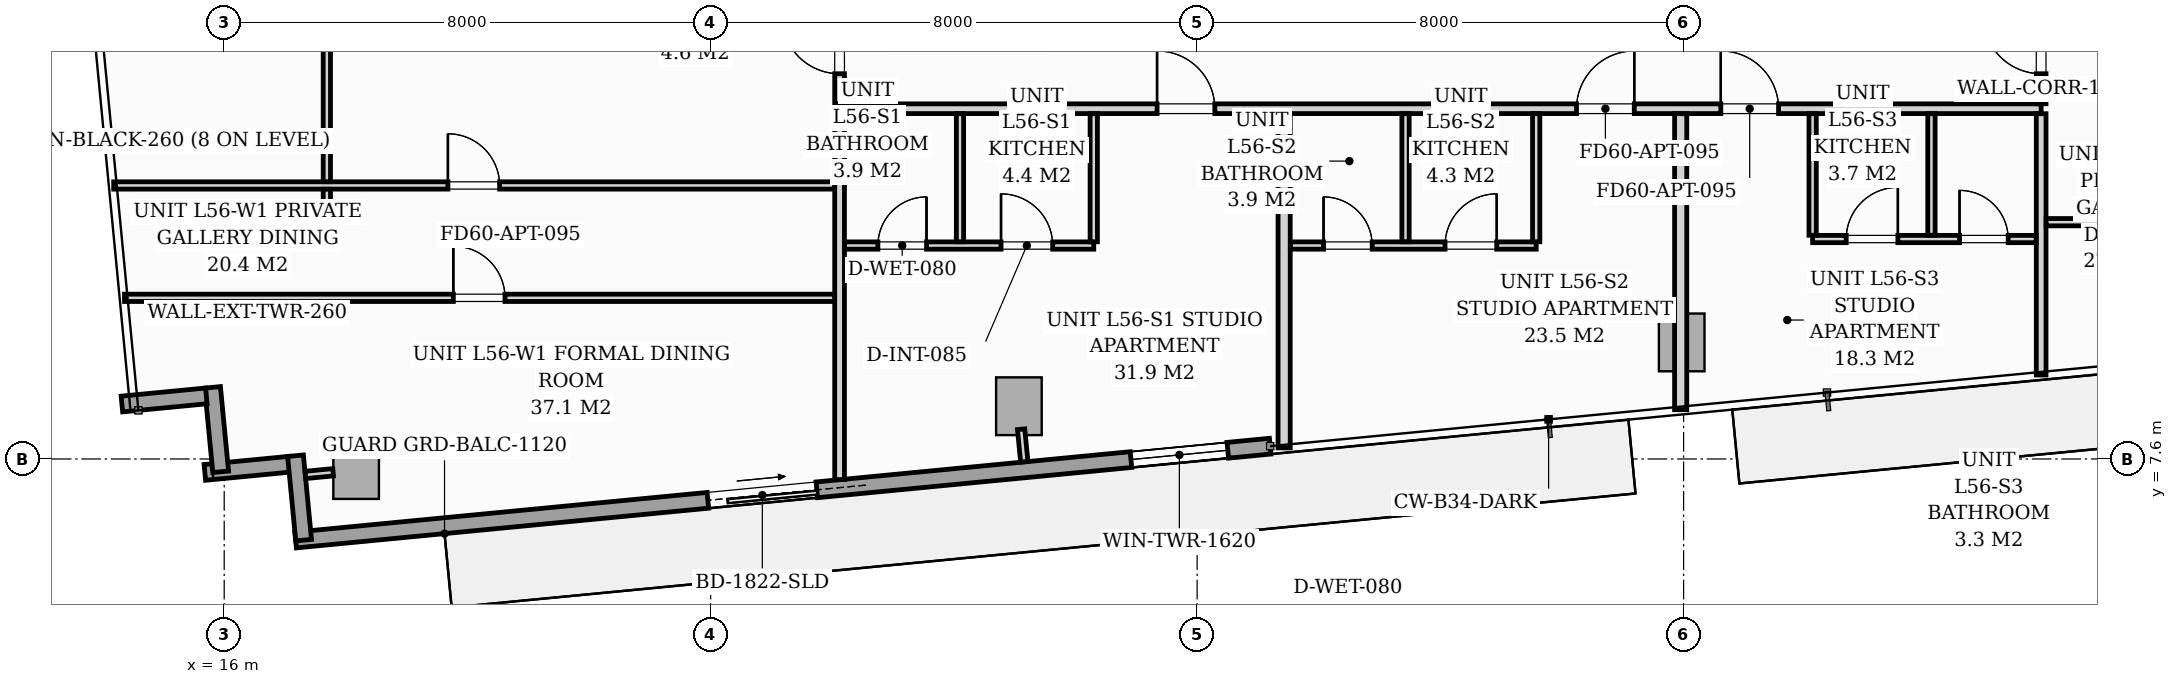
"""IFC4 building model, lengths in metres.
Left out: names, types, materials, properties, quantities, classifications, styles, units other than length and angle.
Written with IfcOpenShell. Run it as: python <this file> out.ifc"""

import sys

from ifc_helpers import new_model, si_unit, direction, frame, frame_2d, origin, origin_2d, place, context, subcontext, project, spatial, rectangle, extrude, source, transform, mapped, element, fill, save


model = new_model("IFC4")
c1 = context("Model", 3, precision=1e-05, world=origin(), true_north=direction((0.0, 1.0)))
c2 = subcontext(c1, "Body", "Model", "MODEL_VIEW")
j1 = project(units=[si_unit("LENGTHUNIT", "METRE"), si_unit("PLANEANGLEUNIT", "RADIAN")], contexts=[c1])
p1 = place(None, origin())
s1 = spatial("IfcSite", under=j1, at=p1, CompositionType="ELEMENT")
p2 = place(p1, origin())
s2 = spatial("IfcBuilding", under=s1, at=p2, CompositionType="ELEMENT")
p3 = place(p2, frame((0.0, 0.0, 195.4)))
s3 = spatial("IfcBuildingStorey", under=s2, at=p3, CompositionType="ELEMENT", Elevation=195.4)
m1 = source(origin(), c2, "Body", "SweptSolid", [
    extrude(rectangle(XDim=0.75, YDim=0.95, at=origin_2d()), origin(), (0.0, 0.0, 1.0), 3.196),
])
for number, where, z_axis, x_axis in (
    (1, (18.169, 7.418, 0.002), (0.0, 0.0, 1.0), (0.995, 0.096, 0.0)),
    (2, (29.069, 8.467, 0.002), (0.0, 0.0, 1.0), (0.995, 0.096, 0.0)),
    (3, (39.969, 9.517, 0.002), (0.0, 0.0, 1.0), (0.995, 0.096, 0.0)),
):
    element("IfcColumn", number, at=place(p3, frame(where, z_axis=z_axis, x_axis=x_axis)), inside=s3, PredefinedType="COLUMN", context=c2, shape_type="MappedRepresentation", body=[
        mapped(m1, transform((0.0, 0.0, 0.0), scale=1.0)),
    ])
p4 = place(p3, frame((17.07, 7.513, 0.0), z_axis=(0.0, 0.0, 1.0), x_axis=(-0.995391056452, -0.09589913835, 0.0)))
e4 = element("IfcWall", 4, at=p4, inside=s3, PredefinedType="STANDARD", context=c2, shape_type="SweptSolid", body=[
    extrude(rectangle(XDim=1.395, YDim=0.26, at=frame_2d((0.698, 0.0))), origin(), (0.0, 0.0, 1.0), 2.94),
])
p5 = place(p3, frame((15.942, 7.389, 0.0), z_axis=(0.0, 0.0, 1.0), x_axis=(-0.095742423056, 0.99540614245, 0.0)))
e5 = element("IfcWall", 5, at=p5, inside=s3, PredefinedType="STANDARD", context=c2, shape_type="SweptSolid", body=[
    extrude(rectangle(XDim=1.395, YDim=0.26, at=frame_2d((0.697, 0.0))), origin(), (0.0, 0.0, 1.0), 2.94),
])
p6 = place(p3, frame((15.706, 8.637, 0.0), z_axis=(0.0, 0.0, 1.0), x_axis=(-0.995391056452, -0.09589913835, 0.0)))
e6 = element("IfcWall", 6, at=p6, inside=s3, PredefinedType="STANDARD", context=c2, shape_type="SweptSolid", body=[
    extrude(rectangle(XDim=1.395, YDim=0.26, at=frame_2d((0.698, 0.0))), origin(), (0.0, 0.0, 1.0), 2.94),
])
p7 = place(p3, frame((33.201, 7.81, 0.0), z_axis=(0.0, 0.0, 1.0), x_axis=(-0.995397074604, -0.095836652014, 0.0)))
e7 = element("IfcWall", 7, at=p7, inside=s3, PredefinedType="STANDARD", context=c2, shape_type="SweptSolid", body=[
    extrude(rectangle(XDim=16.1, YDim=0.26, at=frame_2d((8.05, 0.0))), origin(), (0.0, 0.0, 1.0), 2.94),
])
p8 = place(p7, frame((7.49, 0.0, 0.0)))
e8 = element("IfcOpeningElement", 8, at=p8, cuts=e7, PredefinedType="OPENING", context=c2, shape_type="SweptSolid", body=[
    extrude(rectangle(XDim=1.8, YDim=2.06, at=frame_2d((0.9, 1.03))), frame((0.0, 0.14, 0.0), z_axis=(0.0, -1.0, 0.0), x_axis=(1.0, 0.0, 0.0)), (0.0, 0.0, 1.0), 0.28),
])
p9 = place(p7, frame((0.7, 0.0, 0.65)))
e9 = element("IfcOpeningElement", 9, at=p9, cuts=e7, PredefinedType="OPENING", context=c2, shape_type="SweptSolid", body=[
    extrude(rectangle(XDim=1.6, YDim=1.5, at=frame_2d((0.8, 0.75))), frame((0.0, 0.14, 0.0), z_axis=(0.0, -1.0, 0.0), x_axis=(1.0, 0.0, 0.0)), (0.0, 0.0, 1.0), 0.28),
])
p10 = place(p3, frame((17.306, 6.265, 0.0), z_axis=(0.0, 0.0, 1.0), x_axis=(-0.095915846097, 0.995389446633, 0.0)))
e10 = element("IfcWall", 10, at=p10, inside=s3, PredefinedType="STANDARD", context=c2, shape_type="SweptSolid", body=[
    extrude(rectangle(XDim=1.395, YDim=0.26, at=frame_2d((0.697, 0.0))), origin(), (0.0, 0.0, 1.0), 2.94),
])
p11 = place(p3, frame((26.12, 13.36, 0.0), z_axis=(0.0, 0.0, 1.0), x_axis=(1.0, 0.0, 0.0)))
e11 = element("IfcWall", 11, at=p11, inside=s3, PredefinedType="PARTITIONING", context=c2, shape_type="SweptSolid", body=[
    extrude(rectangle(XDim=19.76, YDim=0.16, at=frame_2d((9.88, 0.0))), origin(), (0.0, 0.0, 1.0), 2.94),
])
p12 = place(p11, frame((5.221, 0.0, 0.0)))
e12 = element("IfcOpeningElement", 12, at=p12, cuts=e11, PredefinedType="OPENING", context=c2, shape_type="SweptSolid", body=[
    extrude(rectangle(XDim=0.95, YDim=2.06, at=frame_2d((0.475, 1.03))), frame((0.0, 0.09, 0.0), z_axis=(0.0, -1.0, 0.0), x_axis=(1.0, 0.0, 0.0)), (0.0, 0.0, 1.0), 0.18),
])
p13 = place(p11, frame((12.119, 0.0, 0.0)))
e13 = element("IfcOpeningElement", 13, at=p13, cuts=e11, PredefinedType="OPENING", context=c2, shape_type="SweptSolid", body=[
    extrude(rectangle(XDim=0.95, YDim=2.06, at=frame_2d((0.475, 1.03))), frame((0.0, 0.09, 0.0), z_axis=(0.0, -1.0, 0.0), x_axis=(1.0, 0.0, 0.0)), (0.0, 0.0, 1.0), 0.18),
])
p14 = place(p11, frame((14.492, 0.0, 0.0)))
e14 = element("IfcOpeningElement", 14, at=p14, cuts=e11, PredefinedType="OPENING", context=c2, shape_type="SweptSolid", body=[
    extrude(rectangle(XDim=0.95, YDim=2.06, at=frame_2d((0.475, 1.03))), frame((0.0, 0.09, 0.0), z_axis=(0.0, -1.0, 0.0), x_axis=(1.0, 0.0, 0.0)), (0.0, 0.0, 1.0), 0.18),
])
p15 = place(p3, frame((26.12, 7.261, 0.0), z_axis=(0.0, 0.0, 1.0), x_axis=(0.0, 1.0, 0.0)))
e15 = element("IfcWall", 15, at=p15, inside=s3, PredefinedType="PARTITIONING", context=c2, shape_type="SweptSolid", body=[
    extrude(rectangle(XDim=6.017, YDim=0.16, at=frame_2d((3.008, 0.0))), origin(), (0.0, 0.0, 1.0), 2.94),
])
p16 = place(p3, frame((26.12, 13.442, 0.0), z_axis=(0.0, 0.0, 1.0), x_axis=(0.0, 1.0, 0.0)))
e16 = element("IfcWall", 16, at=p16, inside=s3, PredefinedType="PARTITIONING", context=c2, shape_type="SweptSolid", body=[
    extrude(rectangle(XDim=4.36, YDim=0.16, at=frame_2d((2.18, 0.0))), origin(), (0.0, 0.0, 1.0), 2.94),
])
p17 = place(p16, frame((0.493, 0.0, 0.0)))
e17 = element("IfcOpeningElement", 17, at=p17, cuts=e16, PredefinedType="OPENING", context=c2, shape_type="SweptSolid", body=[
    extrude(rectangle(XDim=0.95, YDim=2.06, at=frame_2d((0.475, 1.03))), frame((0.0, 0.09, 0.0), z_axis=(0.0, -1.0, 0.0), x_axis=(1.0, 0.0, 0.0)), (0.0, 0.0, 1.0), 0.18),
])
p18 = place(p3, frame((45.88, 8.981, 0.0), z_axis=(0.0, 0.0, 1.0), x_axis=(0.0, 1.0, 0.0)))
e18 = element("IfcWall", 18, at=p18, inside=s3, PredefinedType="PARTITIONING", context=c2, shape_type="SweptSolid", body=[
    extrude(rectangle(XDim=4.297, YDim=0.16, at=frame_2d((2.148, 0.0))), origin(), (0.0, 0.0, 1.0), 2.94),
])
p19 = place(p3, frame((45.88, 13.442, 0.0), z_axis=(0.0, 0.0, 1.0), x_axis=(0.0, 1.0, 0.0)))
e19 = element("IfcWall", 19, at=p19, inside=s3, PredefinedType="PARTITIONING", context=c2, shape_type="SweptSolid", body=[
    extrude(rectangle(XDim=4.36, YDim=0.16, at=frame_2d((2.18, 0.0))), origin(), (0.0, 0.0, 1.0), 2.94),
])
p20 = place(p19, frame((0.493, 0.0, 0.0)))
e20 = element("IfcOpeningElement", 20, at=p20, cuts=e19, PredefinedType="OPENING", context=c2, shape_type="SweptSolid", body=[
    extrude(rectangle(XDim=0.95, YDim=2.06, at=frame_2d((0.475, 1.03))), frame((0.0, 0.09, 0.0), z_axis=(0.0, -1.0, 0.0), x_axis=(1.0, 0.0, 0.0)), (0.0, 0.0, 1.0), 0.18),
])
p21 = place(p3, frame((26.202, 11.11, 0.0), z_axis=(0.0, 0.0, 1.0), x_axis=(1.0, 0.0, 0.0)))
e21 = element("IfcWall", 21, at=p21, inside=s3, PredefinedType="PARTITIONING", context=c2, shape_type="SweptSolid", body=[
    extrude(rectangle(XDim=4.098, YDim=0.12, at=frame_2d((2.049, 0.0))), origin(), (0.0, 0.0, 1.0), 2.94),
])
p22 = place(p21, frame((0.548, 0.0, 0.0)))
e22 = element("IfcOpeningElement", 22, at=p22, cuts=e21, PredefinedType="OPENING", context=c2, shape_type="SweptSolid", body=[
    extrude(rectangle(XDim=0.8, YDim=2.02, at=frame_2d((0.4, 1.01))), frame((0.0, 0.07, 0.0), z_axis=(0.0, -1.0, 0.0), x_axis=(1.0, 0.0, 0.0)), (0.0, 0.0, 1.0), 0.14),
])
p23 = place(p21, frame((2.573, 0.0, 0.0)))
e23 = element("IfcOpeningElement", 23, at=p23, cuts=e21, PredefinedType="OPENING", context=c2, shape_type="SweptSolid", body=[
    extrude(rectangle(XDim=0.85, YDim=2.05, at=frame_2d((0.425, 1.025))), frame((0.0, 0.07, 0.0), z_axis=(0.0, -1.0, 0.0), x_axis=(1.0, 0.0, 0.0)), (0.0, 0.0, 1.0), 0.14),
])
for number, where, z_axis, x_axis in (
    (24, (30.3, 11.172, 0.0), (0.0, 0.0, 1.0), (0.0, 1.0, 0.0)),
    (25, (28.1, 11.172, 0.0), (0.0, 0.0, 1.0), (0.0, 1.0, 0.0)),
):
    element("IfcWall", number, at=place(p3, frame(where, z_axis=z_axis, x_axis=x_axis)), inside=s3, PredefinedType="PARTITIONING", context=c2, shape_type="SweptSolid", body=[
        extrude(rectangle(XDim=2.106, YDim=0.12, at=frame_2d((1.053, 0.0))), origin(), (0.0, 0.0, 1.0), 2.94),
    ])
p24 = place(p3, frame((33.431, 7.782, 0.0), z_axis=(0.0, 0.0, 1.0), x_axis=(0.0, 1.0, 0.0)))
e26 = element("IfcWall", 26, at=p24, inside=s3, PredefinedType="PARTITIONING", context=c2, shape_type="SweptSolid", body=[
    extrude(rectangle(XDim=5.496, YDim=0.2, at=frame_2d((2.748, 0.0))), origin(), (0.0, 0.0, 1.0), 2.94),
])
p25 = place(p3, frame((33.533, 11.11, 0.0), z_axis=(0.0, 0.0, 1.0), x_axis=(1.0, 0.0, 0.0)))
e27 = element("IfcWall", 27, at=p25, inside=s3, PredefinedType="PARTITIONING", context=c2, shape_type="SweptSolid", body=[
    extrude(rectangle(XDim=4.043, YDim=0.12, at=frame_2d((2.021, 0.0))), origin(), (0.0, 0.0, 1.0), 2.94),
])
p26 = place(p25, frame((0.546, 0.0, 0.0)))
e28 = element("IfcOpeningElement", 28, at=p26, cuts=e27, PredefinedType="OPENING", context=c2, shape_type="SweptSolid", body=[
    extrude(rectangle(XDim=0.8, YDim=2.02, at=frame_2d((0.4, 1.01))), frame((0.0, 0.07, 0.0), z_axis=(0.0, -1.0, 0.0), x_axis=(1.0, 0.0, 0.0)), (0.0, 0.0, 1.0), 0.14),
])
p27 = place(p25, frame((2.544, 0.0, 0.0)))
e29 = element("IfcOpeningElement", 29, at=p27, cuts=e27, PredefinedType="OPENING", context=c2, shape_type="SweptSolid", body=[
    extrude(rectangle(XDim=0.85, YDim=2.05, at=frame_2d((0.425, 1.025))), frame((0.0, 0.07, 0.0), z_axis=(0.0, -1.0, 0.0), x_axis=(1.0, 0.0, 0.0)), (0.0, 0.0, 1.0), 0.14),
])
for number, where, z_axis, x_axis in (
    (30, (37.576, 11.172, 0.0), (0.0, 0.0, 1.0), (0.0, 1.0, 0.0)),
    (31, (35.427, 11.172, 0.0), (0.0, 0.0, 1.0), (0.0, 1.0, 0.0)),
):
    element("IfcWall", number, at=place(p3, frame(where, z_axis=z_axis, x_axis=x_axis)), inside=s3, PredefinedType="PARTITIONING", context=c2, shape_type="SweptSolid", body=[
        extrude(rectangle(XDim=2.106, YDim=0.12, at=frame_2d((1.053, 0.0))), origin(), (0.0, 0.0, 1.0), 2.94),
    ])
p28 = place(p3, frame((39.952, 8.41, 0.0), z_axis=(0.0, 0.0, 1.0), x_axis=(0.0, 1.0, 0.0)))
e32 = element("IfcWall", 32, at=p28, inside=s3, PredefinedType="PARTITIONING", context=c2, shape_type="SweptSolid", body=[
    extrude(rectangle(XDim=4.868, YDim=0.2, at=frame_2d((2.434, 0.0))), origin(), (0.0, 0.0, 1.0), 2.94),
])
p29 = place(p3, frame((42.122, 11.217, 0.0), z_axis=(0.0, 0.0, 1.0), x_axis=(1.0, 0.0, 0.0)))
e33 = element("IfcWall", 33, at=p29, inside=s3, PredefinedType="PARTITIONING", context=c2, shape_type="SweptSolid", body=[
    extrude(rectangle(XDim=3.676, YDim=0.12, at=frame_2d((1.838, 0.0))), origin(), (0.0, 0.0, 1.0), 2.94),
])
p30 = place(p29, frame((0.552, 0.0, 0.0)))
e34 = element("IfcOpeningElement", 34, at=p30, cuts=e33, PredefinedType="OPENING", context=c2, shape_type="SweptSolid", body=[
    extrude(rectangle(XDim=0.85, YDim=2.05, at=frame_2d((0.425, 1.025))), frame((0.0, 0.07, 0.0), z_axis=(0.0, -1.0, 0.0), x_axis=(1.0, 0.0, 0.0)), (0.0, 0.0, 1.0), 0.14),
])
p31 = place(p29, frame((2.416, 0.0, 0.0)))
e35 = element("IfcOpeningElement", 35, at=p31, cuts=e33, PredefinedType="OPENING", context=c2, shape_type="SweptSolid", body=[
    extrude(rectangle(XDim=0.8, YDim=2.02, at=frame_2d((0.4, 1.01))), frame((0.0, 0.07, 0.0), z_axis=(0.0, -1.0, 0.0), x_axis=(1.0, 0.0, 0.0)), (0.0, 0.0, 1.0), 0.14),
])
for number, where, z_axis, x_axis in (
    (36, (42.122, 11.279, 0.0), (0.0, 0.0, 1.0), (0.0, 1.0, 0.0)),
    (37, (44.076, 11.279, 0.0), (0.0, 0.0, 1.0), (0.0, 1.0, 0.0)),
):
    element("IfcWall", number, at=place(p3, frame(where, z_axis=z_axis, x_axis=x_axis)), inside=s3, PredefinedType="PARTITIONING", context=c2, shape_type="SweptSolid", body=[
        extrude(rectangle(XDim=1.999, YDim=0.12, at=frame_2d((1.0, 0.0))), origin(), (0.0, 0.0, 1.0), 2.94),
    ])
p32 = place(p3, frame((14.361, 10.25, 0.0), z_axis=(0.0, 0.0, 1.0), x_axis=(1.0, 0.0, 0.0)))
e38 = element("IfcWall", 38, at=p32, inside=s3, PredefinedType="PARTITIONING", context=c2, shape_type="SweptSolid", body=[
    extrude(rectangle(XDim=11.677, YDim=0.12, at=frame_2d((5.839, 0.0))), origin(), (0.0, 0.0, 1.0), 2.94),
])
p33 = place(p32, frame((5.407, 0.0, 0.0)))
e39 = element("IfcOpeningElement", 39, at=p33, cuts=e38, PredefinedType="OPENING", context=c2, shape_type="SweptSolid", body=[
    extrude(rectangle(XDim=0.85, YDim=2.05, at=frame_2d((0.425, 1.025))), frame((0.0, 0.07, 0.0), z_axis=(0.0, -1.0, 0.0), x_axis=(1.0, 0.0, 0.0)), (0.0, 0.0, 1.0), 0.14),
])
p34 = place(p3, frame((14.183, 12.098, 0.0), z_axis=(0.0, 0.0, 1.0), x_axis=(1.0, 0.0, 0.0)))
e40 = element("IfcWall", 40, at=p34, inside=s3, PredefinedType="PARTITIONING", context=c2, shape_type="SweptSolid", body=[
    extrude(rectangle(XDim=11.855, YDim=0.12, at=frame_2d((5.928, 0.0))), origin(), (0.0, 0.0, 1.0), 2.94),
])
p35 = place(p34, frame((5.496, 0.0, 0.0)))
e41 = element("IfcOpeningElement", 41, at=p35, cuts=e40, PredefinedType="OPENING", context=c2, shape_type="SweptSolid", body=[
    extrude(rectangle(XDim=0.85, YDim=2.05, at=frame_2d((0.425, 1.025))), frame((0.0, 0.07, 0.0), z_axis=(0.0, -1.0, 0.0), x_axis=(1.0, 0.0, 0.0)), (0.0, 0.0, 1.0), 0.14),
])
p36 = place(p3, frame((17.688, 11.658, 0.0), z_axis=(0.0, 0.0, 1.0), x_axis=(0.0, 1.0, 0.0)))
e42 = element("IfcWall", 42, at=p36, inside=s3, PredefinedType="PARTITIONING", context=c2, shape_type="SweptSolid", body=[
    extrude(rectangle(XDim=0.378, YDim=0.12, at=frame_2d((0.189, 0.0))), origin(), (0.0, 0.0, 1.0), 2.94),
])
p37 = place(p3, frame((17.688, 12.16, 0.0), z_axis=(0.0, 0.0, 1.0), x_axis=(0.0, 1.0, 0.0)))
e43 = element("IfcWall", 43, at=p37, inside=s3, PredefinedType="PARTITIONING", context=c2, shape_type="SweptSolid", body=[
    extrude(rectangle(XDim=8.689, YDim=0.12, at=frame_2d((4.345, 0.0))), origin(), (0.0, 0.0, 1.0), 2.94),
])
p38 = place(p37, frame((3.92, 0.0, 0.0)))
e44 = element("IfcOpeningElement", 44, at=p38, cuts=e43, PredefinedType="OPENING", context=c2, shape_type="SweptSolid", body=[
    extrude(rectangle(XDim=0.85, YDim=2.05, at=frame_2d((0.425, 1.025))), frame((0.0, 0.07, 0.0), z_axis=(0.0, -1.0, 0.0), x_axis=(1.0, 0.0, 0.0)), (0.0, 0.0, 1.0), 0.14),
])
p39 = place(p3, frame((45.962, 11.494, 0.0), z_axis=(0.0, 0.0, 1.0), x_axis=(1.0, 0.0, 0.0)))
e45 = element("IfcWall", 45, at=p39, inside=s3, PredefinedType="PARTITIONING", context=c2, shape_type="SweptSolid", body=[
    extrude(rectangle(XDim=16.66, YDim=0.12, at=frame_2d((8.33, 0.0))), origin(), (0.0, 0.0, 1.0), 2.383),
])
p40 = place(p39, frame((6.186, 0.0, 0.0)))
e46 = element("IfcOpeningElement", 46, at=p40, cuts=e45, PredefinedType="OPENING", context=c2, shape_type="SweptSolid", body=[
    extrude(rectangle(XDim=0.85, YDim=2.05, at=frame_2d((0.425, 1.025))), frame((0.0, 0.07, 0.0), z_axis=(0.0, -1.0, 0.0), x_axis=(1.0, 0.0, 0.0)), (0.0, 0.0, 1.0), 0.14),
])
p41 = place(p3, frame((17.791, 7.382, 0.0), z_axis=(0.0, 0.0, 1.0), x_axis=(-0.995384576284, -0.09596637586, 0.0)))
e47 = element("IfcWall", 47, at=p41, inside=s3, PredefinedType="PARTITIONING", context=c2, shape_type="SweptSolid", body=[
    extrude(rectangle(XDim=0.458, YDim=0.12, at=frame_2d((0.229, 0.0))), origin(), (0.0, 0.0, 1.0), 2.94),
])
p42 = place(p3, frame((29.105, 8.089, 0.0), z_axis=(0.0, 0.0, 1.0), x_axis=(0.095772948675, -0.995403205893, 0.0)))
e48 = element("IfcWall", 48, at=p42, inside=s3, PredefinedType="PARTITIONING", context=c2, shape_type="SweptSolid", body=[
    extrude(rectangle(XDim=0.538, YDim=0.12, at=frame_2d((0.269, 0.0))), origin(), (0.0, 0.0, 1.0), 2.94),
])
m2 = source(origin(), c2, "Body", "SweptSolid", [
    extrude(rectangle(XDim=1.8, YDim=2.06, at=frame_2d((0.9, 1.03))), frame((0.0, 0.025, 0.0), z_axis=(0.0, -1.0, 0.0), x_axis=(1.0, 0.0, 0.0)), (0.0, 0.0, 1.0), 0.05),
])
p43 = place(p8, origin())
e49 = element("IfcDoor", 49, at=p43, inside=s3, OperationType="SLIDING_TO_LEFT", PredefinedType="DOOR", context=c2, shape_type="MappedRepresentation", body=[
    mapped(m2, transform((0.0, 0.0, 0.0), scale=1.0)),
])
fill(e8, e49)
m3 = source(origin(), c2, "Body", "SweptSolid", [
    extrude(rectangle(XDim=1.6, YDim=1.5, at=frame_2d((0.8, 0.75))), frame((0.0, 0.03, 0.0), z_axis=(0.0, -1.0, 0.0), x_axis=(1.0, 0.0, 0.0)), (0.0, 0.0, 1.0), 0.06),
])
p44 = place(p9, origin())
e50 = element("IfcWindow", 50, at=p44, inside=s3, PartitioningType="SINGLE_PANEL", PredefinedType="WINDOW", context=c2, shape_type="MappedRepresentation", body=[
    mapped(m3, transform((0.0, 0.0, 0.0), scale=1.0)),
])
fill(e9, e50)
m4 = source(origin(), c2, "Body", "SweptSolid", [
    extrude(rectangle(XDim=0.95, YDim=2.06, at=frame_2d((0.475, 1.03))), frame((0.0, 0.025, 0.0), z_axis=(0.0, -1.0, 0.0), x_axis=(1.0, 0.0, 0.0)), (0.0, 0.0, 1.0), 0.05),
])
p45 = place(p12, origin())
e51 = element("IfcDoor", 51, at=p45, inside=s3, OperationType="SINGLE_SWING_LEFT", PredefinedType="DOOR", context=c2, shape_type="MappedRepresentation", body=[
    mapped(m4, transform((0.0, 0.0, 0.0), scale=1.0)),
])
fill(e12, e51)
m5 = source(origin(), c2, "Body", "SweptSolid", [
    extrude(rectangle(XDim=0.8, YDim=2.02, at=frame_2d((0.4, 1.01))), frame((0.0, 0.025, 0.0), z_axis=(0.0, -1.0, 0.0), x_axis=(1.0, 0.0, 0.0)), (0.0, 0.0, 1.0), 0.05),
])
p46 = place(p22, origin())
e52 = element("IfcDoor", 52, at=p46, inside=s3, OperationType="SINGLE_SWING_RIGHT", PredefinedType="DOOR", context=c2, shape_type="MappedRepresentation", body=[
    mapped(m5, transform((0.0, 0.0, 0.0), scale=1.0)),
])
fill(e22, e52)
m6 = source(origin(), c2, "Body", "SweptSolid", [
    extrude(rectangle(XDim=0.85, YDim=2.05, at=frame_2d((0.425, 1.025))), frame((0.0, 0.025, 0.0), z_axis=(0.0, -1.0, 0.0), x_axis=(1.0, 0.0, 0.0)), (0.0, 0.0, 1.0), 0.05),
])
p47 = place(p23, origin())
e53 = element("IfcDoor", 53, at=p47, inside=s3, OperationType="SINGLE_SWING_LEFT", PredefinedType="DOOR", context=c2, shape_type="MappedRepresentation", body=[
    mapped(m6, transform((0.0, 0.0, 0.0), scale=1.0)),
])
fill(e23, e53)
p48 = place(p13, origin())
e54 = element("IfcDoor", 54, at=p48, inside=s3, OperationType="SINGLE_SWING_RIGHT", PredefinedType="DOOR", context=c2, shape_type="MappedRepresentation", body=[
    mapped(m4, transform((0.0, 0.0, 0.0), scale=1.0)),
])
fill(e13, e54)
p49 = place(p26, origin())
e55 = element("IfcDoor", 55, at=p49, inside=s3, OperationType="SINGLE_SWING_LEFT", PredefinedType="DOOR", context=c2, shape_type="MappedRepresentation", body=[
    mapped(m5, transform((0.0, 0.0, 0.0), scale=1.0)),
])
fill(e28, e55)
p50 = place(p27, origin())
e56 = element("IfcDoor", 56, at=p50, inside=s3, OperationType="SINGLE_SWING_RIGHT", PredefinedType="DOOR", context=c2, shape_type="MappedRepresentation", body=[
    mapped(m6, transform((0.0, 0.0, 0.0), scale=1.0)),
])
fill(e29, e56)
p51 = place(p14, origin())
e57 = element("IfcDoor", 57, at=p51, inside=s3, OperationType="SINGLE_SWING_LEFT", PredefinedType="DOOR", context=c2, shape_type="MappedRepresentation", body=[
    mapped(m4, transform((0.0, 0.0, 0.0), scale=1.0)),
])
fill(e14, e57)
p52 = place(p30, origin())
e58 = element("IfcDoor", 58, at=p52, inside=s3, OperationType="SINGLE_SWING_RIGHT", PredefinedType="DOOR", context=c2, shape_type="MappedRepresentation", body=[
    mapped(m6, transform((0.0, 0.0, 0.0), scale=1.0)),
])
fill(e34, e58)
p53 = place(p31, origin())
e59 = element("IfcDoor", 59, at=p53, inside=s3, OperationType="SINGLE_SWING_LEFT", PredefinedType="DOOR", context=c2, shape_type="MappedRepresentation", body=[
    mapped(m5, transform((0.0, 0.0, 0.0), scale=1.0)),
])
fill(e35, e59)
p54 = place(p17, origin())
e60 = element("IfcDoor", 60, at=p54, inside=s3, OperationType="SINGLE_SWING_RIGHT", PredefinedType="DOOR", context=c2, shape_type="MappedRepresentation", body=[
    mapped(m4, transform((0.0, 0.0, 0.0), scale=1.0)),
])
fill(e17, e60)
p55 = place(p33, origin())
e61 = element("IfcDoor", 61, at=p55, inside=s3, OperationType="SINGLE_SWING_LEFT", PredefinedType="DOOR", context=c2, shape_type="MappedRepresentation", body=[
    mapped(m6, transform((0.0, 0.0, 0.0), scale=1.0)),
])
fill(e39, e61)
p56 = place(p35, origin())
e62 = element("IfcDoor", 62, at=p56, inside=s3, OperationType="SINGLE_SWING_LEFT", PredefinedType="DOOR", context=c2, shape_type="MappedRepresentation", body=[
    mapped(m6, transform((0.0, 0.0, 0.0), scale=1.0)),
])
fill(e41, e62)
p57 = place(p20, origin())
e63 = element("IfcDoor", 63, at=p57, inside=s3, OperationType="SINGLE_SWING_RIGHT", PredefinedType="DOOR", context=c2, shape_type="MappedRepresentation", body=[
    mapped(m4, transform((0.0, 0.0, 0.0), scale=1.0)),
])
fill(e20, e63)
save(model, sys.argv[1])
